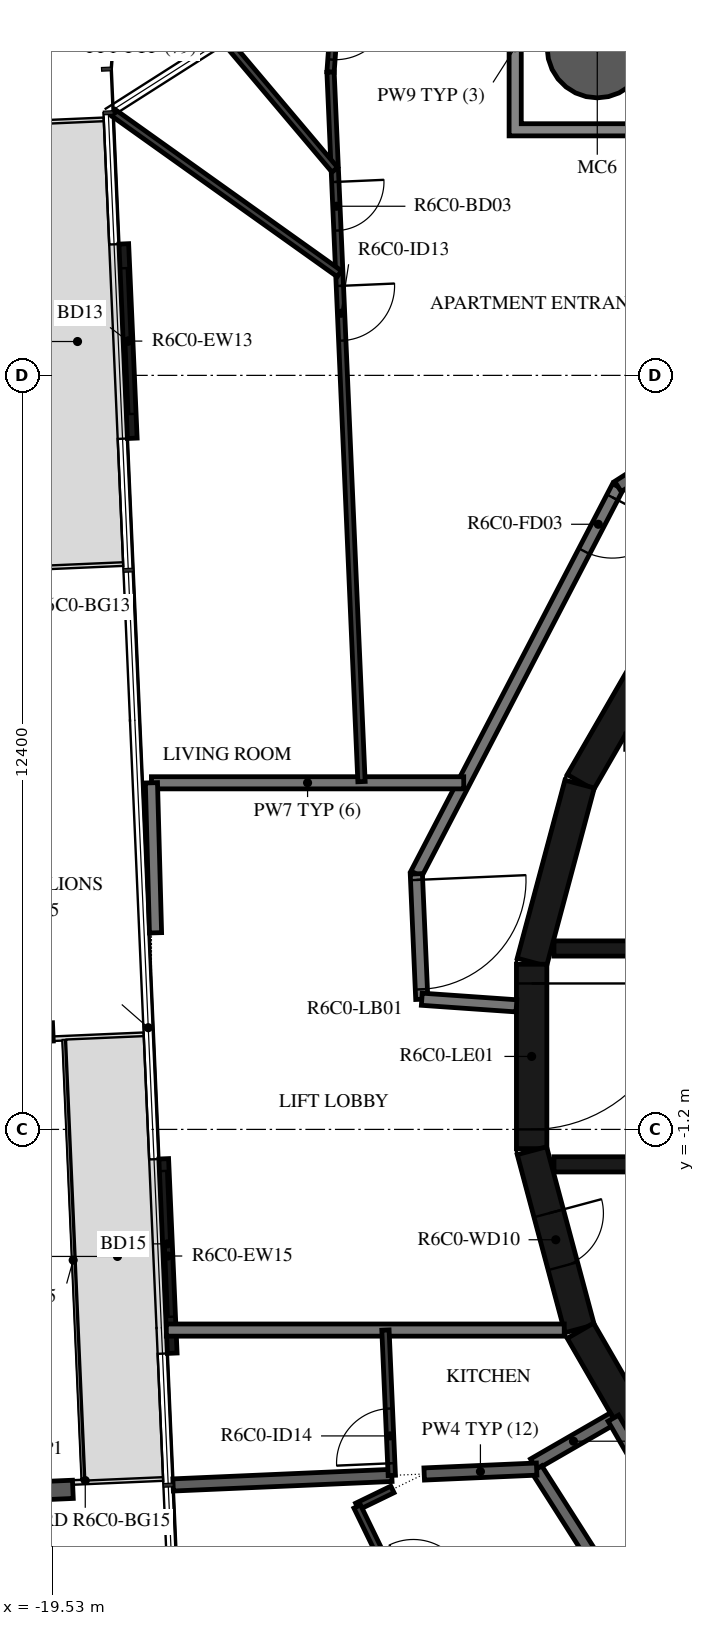
"""IFC4 building model, lengths in metres.
Left out: names, types, materials, properties, quantities, classifications, styles, units other than length and angle.
Written with IfcOpenShell. Run it as: python <this file> out.ifc"""

import sys

from ifc_helpers import new_model, si_unit, direction, frame, frame_2d, origin, origin_2d, place, context, subcontext, project, spatial, polyline, rectangle, hollow_circle, i_section, outline, extrude, element, fill, save


model = new_model("IFC4")
c1 = context("Model", 3, precision=1e-05, world=origin(), true_north=direction((0.0, 1.0)))
c2 = subcontext(c1, "Body", "Model", "MODEL_VIEW")
j1 = project(units=[si_unit("LENGTHUNIT", "METRE"), si_unit("PLANEANGLEUNIT", "RADIAN")], contexts=[c1])
p1 = place(None, origin())
s1 = spatial("IfcSite", under=j1, at=p1, CompositionType="ELEMENT")
p2 = place(p1, origin())
s2 = spatial("IfcBuilding", under=s1, at=p2, CompositionType="ELEMENT")
p3 = place(p2, frame((0.0, 0.0, 254.7)))
s3 = spatial("IfcBuildingStorey", under=s2, at=p3, CompositionType="ELEMENT", Elevation=254.7)
p4 = place(p3, frame((-10.568, 16.588, -0.38), z_axis=(0.0, 0.0, 1.0), x_axis=(1.0, 0.0, 0.0)))
e1 = element("IfcColumn", 1, at=p4, inside=s3, PredefinedType="COLUMN", context=c2, shape_type="SweptSolid", body=[
    extrude(hollow_circle(Radius=0.825, WallThickness=0.04, at=origin_2d()), origin(), (0.0, 0.0, 1.0), 2.616),
])
for number, where, z_axis, x_axis in (
    (2, (-19.97, 0.384, -0.38), (0.0, 0.0, 1.0), (-0.044, 0.999, 0.0)),
    (3, (-19.642, -7.139, -0.38), (0.0, 0.0, 1.0), (-0.044, 0.999, 0.0)),
):
    element("IfcColumn", number, at=place(p3, frame(where, z_axis=z_axis, x_axis=x_axis)), inside=s3, PredefinedType="COLUMN", context=c2, shape_type="SweptSolid", body=[
        extrude(i_section(OverallWidth=0.3, OverallDepth=0.9, WebThickness=0.019, FlangeThickness=0.035, FilletRadius=0.03, at=origin_2d()), origin(), (0.0, 0.0, 1.0), 2.616),
    ])
p5 = place(p3, frame((-18.355, 13.362, 0.0), z_axis=(0.0, 0.0, 1.0), x_axis=(0.043639181999, -0.999047357133, 0.0)))
e4 = element("IfcWall", 4, at=p5, inside=s3, PredefinedType="STANDARD", context=c2, shape_type="SweptSolid", body=[
    extrude(rectangle(XDim=3.2, YDim=0.16, at=frame_2d((1.6, 0.0))), origin(), (0.0, 0.0, 1.0), 3.05),
])
p6 = place(p5, frame((0.4, 0.0, 0.0)))
e5 = element("IfcOpeningElement", 5, at=p6, cuts=e4, PredefinedType="OPENING", context=c2, shape_type="SweptSolid", body=[
    extrude(rectangle(XDim=2.4, YDim=2.4, at=frame_2d((1.2, 1.2))), frame((0.0, 0.09, 0.0), z_axis=(0.0, -1.0, 0.0), x_axis=(1.0, 0.0, 0.0)), (0.0, 0.0, 1.0), 0.18),
])
p7 = place(p3, frame((-17.698, -1.684, 0.0), z_axis=(0.0, 0.0, 1.0), x_axis=(0.043639181999, -0.999047357133, 0.0)))
e6 = element("IfcWall", 6, at=p7, inside=s3, PredefinedType="STANDARD", context=c2, shape_type="SweptSolid", body=[
    extrude(rectangle(XDim=3.2, YDim=0.16, at=frame_2d((1.6, 0.0))), origin(), (0.0, 0.0, 1.0), 3.05),
])
p8 = place(p7, frame((0.2, 0.0, 0.0)))
e7 = element("IfcOpeningElement", 7, at=p8, cuts=e6, PredefinedType="OPENING", context=c2, shape_type="SweptSolid", body=[
    extrude(rectangle(XDim=2.4, YDim=2.4, at=frame_2d((1.2, 1.2))), frame((0.0, 0.09, 0.0), z_axis=(0.0, -1.0, 0.0), x_axis=(1.0, 0.0, 0.0)), (0.0, 0.0, 1.0), 0.18),
])
for number, where, z_axis, x_axis in (
    (8, (-9.329, 7.137, 0.0), (0.0, 0.0, 1.0), (-0.5, -0.866, 0.0)),
    (9, (-10.858, 4.479, 0.0), (0.0, 0.0, 1.0), (-0.259, -0.966, 0.0)),
):
    element("IfcWall", number, at=place(p3, frame(where, z_axis=z_axis, x_axis=x_axis)), inside=s3, PredefinedType="SHEAR", context=c2, shape_type="SweptSolid", body=[
        extrude(rectangle(XDim=3.033, YDim=0.5, at=frame_2d((1.516, 0.0))), origin(), (0.0, 0.0, 1.0), 3.05),
    ])
p9 = place(p3, frame((-11.647, 1.516, 0.0), z_axis=(0.0, 0.0, 1.0), x_axis=(0.0, -1.0, 0.0)))
e10 = element("IfcWall", 10, at=p9, inside=s3, PredefinedType="SHEAR", context=c2, shape_type="SweptSolid", body=[
    extrude(rectangle(XDim=3.033, YDim=0.5, at=frame_2d((1.516, 0.0))), origin(), (0.0, 0.0, 1.0), 3.05),
])
p10 = place(p9, frame((0.316, 0.0, 0.0)))
e11 = element("IfcOpeningElement", 11, at=p10, cuts=e10, PredefinedType="OPENING", context=c2, shape_type="SweptSolid", body=[
    extrude(rectangle(XDim=2.4, YDim=2.1, at=frame_2d((1.2, 1.05))), frame((0.0, 0.26, 0.0), z_axis=(0.0, -1.0, 0.0), x_axis=(1.0, 0.0, 0.0)), (0.0, 0.0, 1.0), 0.52),
])
p11 = place(p3, frame((-11.643, -1.55, 0.0), z_axis=(0.0, 0.0, 1.0), x_axis=(0.258734743916, -0.965948410781, 0.0)))
e12 = element("IfcWall", 12, at=p11, inside=s3, PredefinedType="SHEAR", context=c2, shape_type="SweptSolid", body=[
    extrude(rectangle(XDim=3.033, YDim=0.5, at=frame_2d((1.516, 0.0))), origin(), (0.0, 0.0, 1.0), 3.05),
])
p12 = place(p11, frame((1.066, 0.0, 0.0)))
e13 = element("IfcOpeningElement", 13, at=p12, cuts=e12, PredefinedType="OPENING", context=c2, shape_type="SweptSolid", body=[
    extrude(rectangle(XDim=0.9, YDim=2.1, at=frame_2d((0.45, 1.05))), frame((0.0, 0.26, 0.0), z_axis=(0.0, -1.0, 0.0), x_axis=(1.0, 0.0, 0.0)), (0.0, 0.0, 1.0), 0.52),
])
p13 = place(p3, frame((-10.845, -4.51, 0.0), z_axis=(0.0, 0.0, 1.0), x_axis=(0.500087131594, -0.865975092491, 0.0)))
e14 = element("IfcWall", 14, at=p13, inside=s3, PredefinedType="SHEAR", context=c2, shape_type="SweptSolid", body=[
    extrude(rectangle(XDim=3.033, YDim=0.5, at=frame_2d((1.516, 0.0))), origin(), (0.0, 0.0, 1.0), 3.05),
])
p14 = place(p3, frame((-11.28, 1.775, 0.0), z_axis=(0.0, 0.0, 1.0), x_axis=(1.0, 0.0, 0.0)))
e15 = element("IfcWall", 15, at=p14, inside=s3, PredefinedType="SHEAR", context=c2, shape_type="SweptSolid", body=[
    extrude(rectangle(XDim=14.38, YDim=0.25, at=frame_2d((7.19, 0.0))), origin(), (0.0, 0.0, 1.0), 3.05),
])
p15 = place(p14, frame((10.73, 0.0, 0.0)))
e16 = element("IfcOpeningElement", 16, at=p15, cuts=e15, PredefinedType="OPENING", context=c2, shape_type="SweptSolid", body=[
    extrude(rectangle(XDim=1.1, YDim=2.1, at=frame_2d((0.55, 1.05))), frame((0.0, 0.135, 0.0), z_axis=(0.0, -1.0, 0.0), x_axis=(1.0, 0.0, 0.0)), (0.0, 0.0, 1.0), 0.27),
])
p16 = place(p14, frame((12.88, 0.0, 0.0)))
e17 = element("IfcOpeningElement", 17, at=p16, cuts=e15, PredefinedType="OPENING", context=c2, shape_type="SweptSolid", body=[
    extrude(rectangle(XDim=1.1, YDim=2.1, at=frame_2d((0.55, 1.05))), frame((0.0, 0.135, 0.0), z_axis=(0.0, -1.0, 0.0), x_axis=(1.0, 0.0, 0.0)), (0.0, 0.0, 1.0), 0.27),
])
p17 = place(p14, frame((5.455, 0.0, 0.0)))
e18 = element("IfcOpeningElement", 18, at=p17, cuts=e15, PredefinedType="OPENING", context=c2, shape_type="SweptSolid", body=[
    extrude(rectangle(XDim=0.9, YDim=2.1, at=frame_2d((0.45, 1.05))), frame((0.0, 0.135, 0.0), z_axis=(0.0, -1.0, 0.0), x_axis=(1.0, 0.0, 0.0)), (0.0, 0.0, 1.0), 0.27),
])
p18 = place(p3, frame((-11.28, -1.775, 0.0), z_axis=(0.0, 0.0, 1.0), x_axis=(1.0, 0.0, 0.0)))
e19 = element("IfcWall", 19, at=p18, inside=s3, PredefinedType="SHEAR", context=c2, shape_type="SweptSolid", body=[
    extrude(rectangle(XDim=14.38, YDim=0.25, at=frame_2d((7.19, 0.0))), origin(), (0.0, 0.0, 1.0), 3.05),
])
p19 = place(p18, frame((12.88, 0.0, 0.0)))
e20 = element("IfcOpeningElement", 20, at=p19, cuts=e19, PredefinedType="OPENING", context=c2, shape_type="SweptSolid", body=[
    extrude(rectangle(XDim=1.1, YDim=2.1, at=frame_2d((0.55, 1.05))), frame((0.0, 0.135, 0.0), z_axis=(0.0, -1.0, 0.0), x_axis=(1.0, 0.0, 0.0)), (0.0, 0.0, 1.0), 0.27),
])
p20 = place(p18, frame((6.53, 0.0, 0.0)))
e21 = element("IfcOpeningElement", 21, at=p20, cuts=e19, PredefinedType="OPENING", context=c2, shape_type="SweptSolid", body=[
    extrude(rectangle(XDim=0.9, YDim=2.1, at=frame_2d((0.45, 1.05))), frame((0.0, 0.135, 0.0), z_axis=(0.0, -1.0, 0.0), x_axis=(1.0, 0.0, 0.0)), (0.0, 0.0, 1.0), 0.27),
])
p21 = place(p18, frame((8.68, 0.0, 0.0)))
e22 = element("IfcOpeningElement", 22, at=p21, cuts=e19, PredefinedType="OPENING", context=c2, shape_type="SweptSolid", body=[
    extrude(rectangle(XDim=0.9, YDim=2.1, at=frame_2d((0.45, 1.05))), frame((0.0, 0.135, 0.0), z_axis=(0.0, -1.0, 0.0), x_axis=(1.0, 0.0, 0.0)), (0.0, 0.0, 1.0), 0.27),
])
p22 = place(p18, frame((10.83, 0.0, 0.0)))
e23 = element("IfcOpeningElement", 23, at=p22, cuts=e19, PredefinedType="OPENING", context=c2, shape_type="SweptSolid", body=[
    extrude(rectangle(XDim=0.9, YDim=2.1, at=frame_2d((0.45, 1.05))), frame((0.0, 0.135, 0.0), z_axis=(0.0, -1.0, 0.0), x_axis=(1.0, 0.0, 0.0)), (0.0, 0.0, 1.0), 0.27),
])
p23 = place(p3, frame((-10.228, 9.372, 0.0), z_axis=(0.0, 0.0, 1.0), x_axis=(-0.461759464021, -0.887005184532, 0.0)))
e24 = element("IfcWall", 24, at=p23, inside=s3, PredefinedType="STANDARD", context=c2, shape_type="SweptSolid", body=[
    extrude(rectangle(XDim=7.181, YDim=0.2, at=frame_2d((3.591, 0.0))), origin(), (0.0, 0.0, 1.0), 3.05),
])
p24 = place(p23, frame((0.2, 0.0, 0.0)))
e25 = element("IfcOpeningElement", 25, at=p24, cuts=e24, PredefinedType="OPENING", context=c2, shape_type="SweptSolid", body=[
    extrude(rectangle(XDim=1.0, YDim=2.1, at=frame_2d((0.5, 1.05))), frame((0.0, 0.11, 0.0), z_axis=(0.0, -1.0, 0.0), x_axis=(1.0, 0.0, 0.0)), (0.0, 0.0, 1.0), 0.22),
])
p25 = place(p3, frame((-13.544, 3.003, 0.0), z_axis=(0.0, 0.0, 1.0), x_axis=(0.043652842459, -0.99904676034, 0.0)))
e26 = element("IfcWall", 26, at=p25, inside=s3, PredefinedType="STANDARD", context=c2, shape_type="SweptSolid", body=[
    extrude(rectangle(XDim=2.064, YDim=0.2, at=frame_2d((1.032, 0.0))), origin(), (0.0, 0.0, 1.0), 3.05),
])
p26 = place(p25, frame((0.1, 0.0, 0.0)))
e27 = element("IfcOpeningElement", 27, at=p26, cuts=e26, PredefinedType="OPENING", context=c2, shape_type="SweptSolid", body=[
    extrude(rectangle(XDim=1.8, YDim=2.1, at=frame_2d((0.9, 1.05))), frame((0.0, 0.11, 0.0), z_axis=(0.0, -1.0, 0.0), x_axis=(1.0, 0.0, 0.0)), (0.0, 0.0, 1.0), 0.22),
])
p27 = place(p3, frame((-13.454, 0.941, 0.0), z_axis=(0.0, 0.0, 1.0), x_axis=(0.99755155062, -0.069934997354, 0.0)))
e28 = element("IfcWall", 28, at=p27, inside=s3, PredefinedType="STANDARD", context=c2, shape_type="SweptSolid", body=[
    extrude(rectangle(XDim=1.561, YDim=0.2, at=frame_2d((0.78, 0.0))), origin(), (0.0, 0.0, 1.0), 3.05),
])
p28 = place(p3, frame((-4.172, 13.231, 0.0), z_axis=(0.0, 0.0, 1.0), x_axis=(-0.843388394728, -0.537304397561, 0.0)))
e29 = element("IfcWall", 29, at=p28, inside=s3, PredefinedType="STANDARD", context=c2, shape_type="SweptSolid", body=[
    extrude(rectangle(XDim=7.181, YDim=0.2, at=frame_2d((3.59, 0.0))), origin(), (0.0, 0.0, 1.0), 3.05),
])
p29 = place(p3, frame((-10.303, -5.949, 0.0), z_axis=(0.0, 0.0, 1.0), x_axis=(-0.866043382451, -0.499968858743, 0.0)))
e30 = element("IfcWall", 30, at=p29, inside=s3, PredefinedType="STANDARD", context=c2, shape_type="SweptSolid", body=[
    extrude(rectangle(XDim=1.515, YDim=0.2, at=frame_2d((0.758, 0.0))), origin(), (0.0, 0.0, 1.0), 3.05),
])
p30 = place(p3, frame((-9.52, -7.305, 0.0), z_axis=(0.0, 0.0, 1.0), x_axis=(-0.500028278809, 0.866009076391, 0.0)))
e31 = element("IfcWall", 31, at=p30, inside=s3, PredefinedType="STANDARD", context=c2, shape_type="SweptSolid", body=[
    extrude(rectangle(XDim=1.566, YDim=0.2, at=frame_2d((0.783, 0.0))), origin(), (0.0, 0.0, 1.0), 3.05),
])
p31 = place(p3, frame((-11.565, -6.786, 0.0), z_axis=(0.0, 0.0, 1.0), x_axis=(0.537297327359, -0.843392898958, 0.0)))
e32 = element("IfcWall", 32, at=p31, inside=s3, PredefinedType="STANDARD", context=c2, shape_type="SweptSolid", body=[
    extrude(rectangle(XDim=4.081, YDim=0.2, at=frame_2d((2.041, 0.0))), origin(), (0.0, 0.0, 1.0), 3.05),
])
p32 = place(p3, frame((-12.764, 4.5, 0.0), z_axis=(0.0, 0.0, 1.0), x_axis=(-1.0, 0.0, 0.0)))
e33 = element("IfcWall", 33, at=p32, inside=s3, PredefinedType="STANDARD", context=c2, shape_type="SweptSolid", body=[
    extrude(rectangle(XDim=5.135, YDim=0.2, at=frame_2d((2.568, 0.0))), origin(), (0.0, 0.0, 1.0), 3.05),
])
p33 = place(p3, frame((-17.9, 4.5, 0.0), z_axis=(0.0, 0.0, 1.0), x_axis=(0.027204178319, -0.999629897853, 0.0)))
e34 = element("IfcWall", 34, at=p33, inside=s3, PredefinedType="STANDARD", context=c2, shape_type="SweptSolid", body=[
    extrude(rectangle(XDim=2.468, YDim=0.2, at=frame_2d((1.234, 0.0))), origin(), (0.0, 0.0, 1.0), 3.05),
])
p34 = place(p3, frame((-17.655, -4.5, 0.0), z_axis=(0.0, 0.0, 1.0), x_axis=(1.0, 0.0, 0.0)))
e35 = element("IfcWall", 35, at=p34, inside=s3, PredefinedType="STANDARD", context=c2, shape_type="SweptSolid", body=[
    extrude(rectangle(XDim=6.543, YDim=0.2, at=frame_2d((3.272, 0.0))), origin(), (0.0, 0.0, 1.0), 3.05),
])
p35 = place(p3, frame((-17.544, -7.047, 0.0), z_axis=(0.0, 0.0, 1.0), x_axis=(0.999045894436, 0.043672655174, 0.0)))
e36 = element("IfcWall", 36, at=p35, inside=s3, PredefinedType="STANDARD", context=c2, shape_type="SweptSolid", body=[
    extrude(rectangle(XDim=3.6, YDim=0.2, at=frame_2d((1.8, 0.0))), origin(), (0.0, 0.0, 1.0), 3.05),
])
p36 = place(p3, frame((-13.414, -6.867, 0.0), z_axis=(0.0, 0.0, 1.0), x_axis=(0.999046427216, 0.043660465726, 0.0)))
e37 = element("IfcWall", 37, at=p36, inside=s3, PredefinedType="STANDARD", context=c2, shape_type="SweptSolid", body=[
    extrude(rectangle(XDim=1.851, YDim=0.2, at=frame_2d((0.925, 0.0))), origin(), (0.0, 0.0, 1.0), 3.05),
])
p37 = place(p3, frame((-14.865, 17.411, 0.0), z_axis=(0.0, 0.0, 1.0), x_axis=(-0.072618457011, -0.997359794508, 0.0)))
e38 = element("IfcWall", 38, at=p37, inside=s3, PredefinedType="PARTITIONING", context=c2, shape_type="SweptSolid", body=[
    extrude(rectangle(XDim=1.227, YDim=0.12, at=frame_2d((0.614, 0.0))), origin(), (0.0, 0.0, 1.0), 3.05),
])
p38 = place(p37, frame((0.12, 0.0, 0.0)))
e39 = element("IfcOpeningElement", 39, at=p38, cuts=e38, PredefinedType="OPENING", context=c2, shape_type="SweptSolid", body=[
    extrude(rectangle(XDim=0.9, YDim=2.1, at=frame_2d((0.45, 1.05))), frame((0.0, 0.07, 0.0), z_axis=(0.0, -1.0, 0.0), x_axis=(1.0, 0.0, 0.0)), (0.0, 0.0, 1.0), 0.14),
])
p39 = place(p3, frame((-14.955, 16.187, 0.0), z_axis=(0.0, 0.0, 1.0), x_axis=(0.04360777668, -0.999048728448, 0.0)))
e40 = element("IfcWall", 40, at=p39, inside=s3, PredefinedType="PARTITIONING", context=c2, shape_type="SweptSolid", body=[
    extrude(rectangle(XDim=11.679, YDim=0.12, at=frame_2d((5.839, 0.0))), origin(), (0.0, 0.0, 1.0), 3.05),
])
p40 = place(p39, frame((1.808, 0.0, 0.0)))
e41 = element("IfcOpeningElement", 41, at=p40, cuts=e40, PredefinedType="OPENING", context=c2, shape_type="SweptSolid", body=[
    extrude(rectangle(XDim=0.8, YDim=2.1, at=frame_2d((0.4, 1.05))), frame((0.0, 0.07, 0.0), z_axis=(0.0, -1.0, 0.0), x_axis=(1.0, 0.0, 0.0)), (0.0, 0.0, 1.0), 0.14),
])
p41 = place(p39, frame((3.519, 0.0, 0.0)))
e42 = element("IfcOpeningElement", 42, at=p41, cuts=e40, PredefinedType="OPENING", context=c2, shape_type="SweptSolid", body=[
    extrude(rectangle(XDim=0.9, YDim=2.1, at=frame_2d((0.45, 1.05))), frame((0.0, 0.07, 0.0), z_axis=(0.0, -1.0, 0.0), x_axis=(1.0, 0.0, 0.0)), (0.0, 0.0, 1.0), 0.14),
])
p42 = place(p3, frame((-18.269, 18.589, 0.0), z_axis=(0.0, 0.0, 1.0), x_axis=(0.645124067673, -0.764077834588, 0.0)))
e43 = element("IfcWall", 43, at=p42, inside=s3, PredefinedType="PARTITIONING", context=c2, shape_type="SweptSolid", body=[
    extrude(rectangle(XDim=5.246, YDim=0.12, at=frame_2d((2.623, 0.0))), origin(), (0.0, 0.0, 1.0), 3.05),
])
p43 = place(p3, frame((-18.529, 15.522, 0.0), z_axis=(0.0, 0.0, 1.0), x_axis=(0.814350646776, -0.580373176582, 0.0)))
e44 = element("IfcWall", 44, at=p43, inside=s3, PredefinedType="PARTITIONING", context=c2, shape_type="SweptSolid", body=[
    extrude(rectangle(XDim=4.567, YDim=0.12, at=frame_2d((2.284, 0.0))), origin(), (0.0, 0.0, 1.0), 3.05),
])
p44 = place(p3, frame((-13.947, -6.89, 0.0), z_axis=(0.0, 0.0, 1.0), x_axis=(-0.043680814195, 0.999045537737, 0.0)))
e45 = element("IfcWall", 45, at=p44, inside=s3, PredefinedType="PARTITIONING", context=c2, shape_type="SweptSolid", body=[
    extrude(rectangle(XDim=2.392, YDim=0.12, at=frame_2d((1.196, 0.0))), origin(), (0.0, 0.0, 1.0), 3.05),
])
p45 = place(p44, frame((0.2, 0.0, 0.0)))
e46 = element("IfcOpeningElement", 46, at=p45, cuts=e45, PredefinedType="OPENING", context=c2, shape_type="SweptSolid", body=[
    extrude(rectangle(XDim=0.9, YDim=2.1, at=frame_2d((0.45, 1.05))), frame((0.0, 0.07, 0.0), z_axis=(0.0, -1.0, 0.0), x_axis=(1.0, 0.0, 0.0)), (0.0, 0.0, 1.0), 0.14),
])
p46 = place(p3, frame((-13.937, -7.121, 0.0), z_axis=(0.0, 0.0, 1.0), x_axis=(-0.899601864835, -0.436710985418, 0.0)))
e47 = element("IfcWall", 47, at=p46, inside=s3, PredefinedType="PARTITIONING", context=c2, shape_type="SweptSolid", body=[
    extrude(rectangle(XDim=0.644, YDim=0.12, at=frame_2d((0.322, 0.0))), origin(), (0.0, 0.0, 1.0), 3.05),
])
p47 = place(p3, frame((-14.516, -7.402, 0.0), z_axis=(0.0, 0.0, 1.0), x_axis=(0.436676244377, -0.899618729016, 0.0)))
e48 = element("IfcWall", 48, at=p47, inside=s3, PredefinedType="PARTITIONING", context=c2, shape_type="SweptSolid", body=[
    extrude(rectangle(XDim=1.487, YDim=0.12, at=frame_2d((0.744, 0.0))), origin(), (0.0, 0.0, 1.0), 3.05),
])
p48 = place(p3, origin())
e49 = element("IfcWall", 49, at=p48, inside=s3, PredefinedType="STANDARD", context=c2, shape_type="SweptSolid", body=[
    extrude(outline(polyline([(-9.118, 18.038), (-9.118, 15.138), (-12.018, 15.138), (-12.018, 18.038), (-9.118, 18.038)]), holes=[polyline([(-11.818, 15.338), (-9.318, 15.338), (-9.318, 17.838), (-11.818, 17.838), (-11.818, 15.338)])]), origin(), (0.0, 0.0, 1.0), 3.05),
])
p49 = place(p6, origin())
e50 = element("IfcDoor", 50, at=p49, inside=s3, OperationType="DOUBLE_DOOR_SLIDING", PredefinedType="DOOR", context=c2, shape_type="SweptSolid", body=[
    extrude(rectangle(XDim=2.4, YDim=2.4, at=frame_2d((1.2, 1.2))), frame((0.0, 0.025, 0.0), z_axis=(0.0, -1.0, 0.0), x_axis=(1.0, 0.0, 0.0)), (0.0, 0.0, 1.0), 0.05),
])
fill(e5, e50)
p50 = place(p8, origin())
e51 = element("IfcDoor", 51, at=p50, inside=s3, OperationType="DOUBLE_DOOR_SLIDING", PredefinedType="DOOR", context=c2, shape_type="SweptSolid", body=[
    extrude(rectangle(XDim=2.4, YDim=2.4, at=frame_2d((1.2, 1.2))), frame((0.0, 0.025, 0.0), z_axis=(0.0, -1.0, 0.0), x_axis=(1.0, 0.0, 0.0)), (0.0, 0.0, 1.0), 0.05),
])
fill(e7, e51)
p51 = place(p10, origin())
e52 = element("IfcDoor", 52, at=p51, inside=s3, OperationType="DOUBLE_DOOR_SINGLE_SWING", PredefinedType="DOOR", context=c2, shape_type="SweptSolid", body=[
    extrude(rectangle(XDim=2.4, YDim=2.1, at=frame_2d((1.2, 1.05))), frame((0.0, 0.025, 0.0), z_axis=(0.0, -1.0, 0.0), x_axis=(1.0, 0.0, 0.0)), (0.0, 0.0, 1.0), 0.05),
])
fill(e11, e52)
p52 = place(p12, origin())
e53 = element("IfcDoor", 53, at=p52, inside=s3, OperationType="SINGLE_SWING_RIGHT", PredefinedType="DOOR", context=c2, shape_type="SweptSolid", body=[
    extrude(rectangle(XDim=0.9, YDim=2.1, at=frame_2d((0.45, 1.05))), frame((0.0, 0.025, 0.0), z_axis=(0.0, -1.0, 0.0), x_axis=(1.0, 0.0, 0.0)), (0.0, 0.0, 1.0), 0.05),
])
fill(e13, e53)
p53 = place(p24, origin())
e54 = element("IfcDoor", 54, at=p53, inside=s3, OperationType="SINGLE_SWING_LEFT", PredefinedType="DOOR", context=c2, shape_type="SweptSolid", body=[
    extrude(rectangle(XDim=1.0, YDim=2.1, at=frame_2d((0.5, 1.05))), frame((0.0, 0.025, 0.0), z_axis=(0.0, -1.0, 0.0), x_axis=(1.0, 0.0, 0.0)), (0.0, 0.0, 1.0), 0.05),
])
fill(e25, e54)
p54 = place(p38, origin())
e55 = element("IfcDoor", 55, at=p54, inside=s3, OperationType="SINGLE_SWING_LEFT", PredefinedType="DOOR", context=c2, shape_type="SweptSolid", body=[
    extrude(rectangle(XDim=0.9, YDim=2.1, at=frame_2d((0.45, 1.05))), frame((0.0, 0.025, 0.0), z_axis=(0.0, -1.0, 0.0), x_axis=(1.0, 0.0, 0.0)), (0.0, 0.0, 1.0), 0.05),
])
fill(e39, e55)
p55 = place(p40, origin())
e56 = element("IfcDoor", 56, at=p55, inside=s3, OperationType="SINGLE_SWING_LEFT", PredefinedType="DOOR", context=c2, shape_type="SweptSolid", body=[
    extrude(rectangle(XDim=0.8, YDim=2.1, at=frame_2d((0.4, 1.05))), frame((0.0, 0.025, 0.0), z_axis=(0.0, -1.0, 0.0), x_axis=(1.0, 0.0, 0.0)), (0.0, 0.0, 1.0), 0.05),
])
fill(e41, e56)
p56 = place(p41, origin())
e57 = element("IfcDoor", 57, at=p56, inside=s3, OperationType="SINGLE_SWING_LEFT", PredefinedType="DOOR", context=c2, shape_type="SweptSolid", body=[
    extrude(rectangle(XDim=0.9, YDim=2.1, at=frame_2d((0.45, 1.05))), frame((0.0, 0.025, 0.0), z_axis=(0.0, -1.0, 0.0), x_axis=(1.0, 0.0, 0.0)), (0.0, 0.0, 1.0), 0.05),
])
fill(e42, e57)
p57 = place(p45, origin())
e58 = element("IfcDoor", 58, at=p57, inside=s3, OperationType="SINGLE_SWING_LEFT", PredefinedType="DOOR", context=c2, shape_type="SweptSolid", body=[
    extrude(rectangle(XDim=0.9, YDim=2.1, at=frame_2d((0.45, 1.05))), frame((0.0, 0.025, 0.0), z_axis=(0.0, -1.0, 0.0), x_axis=(1.0, 0.0, 0.0)), (0.0, 0.0, 1.0), 0.05),
])
fill(e46, e58)
p58 = place(p26, origin())
e59 = element("IfcDoor", 59, at=p58, inside=s3, OperationType="DOUBLE_DOOR_SINGLE_SWING", PredefinedType="DOOR", context=c2, shape_type="SweptSolid", body=[
    extrude(rectangle(XDim=1.8, YDim=2.1, at=frame_2d((0.9, 1.05))), frame((0.0, 0.025, 0.0), z_axis=(0.0, -1.0, 0.0), x_axis=(1.0, 0.0, 0.0)), (0.0, 0.0, 1.0), 0.05),
])
fill(e27, e59)
save(model, sys.argv[1])
